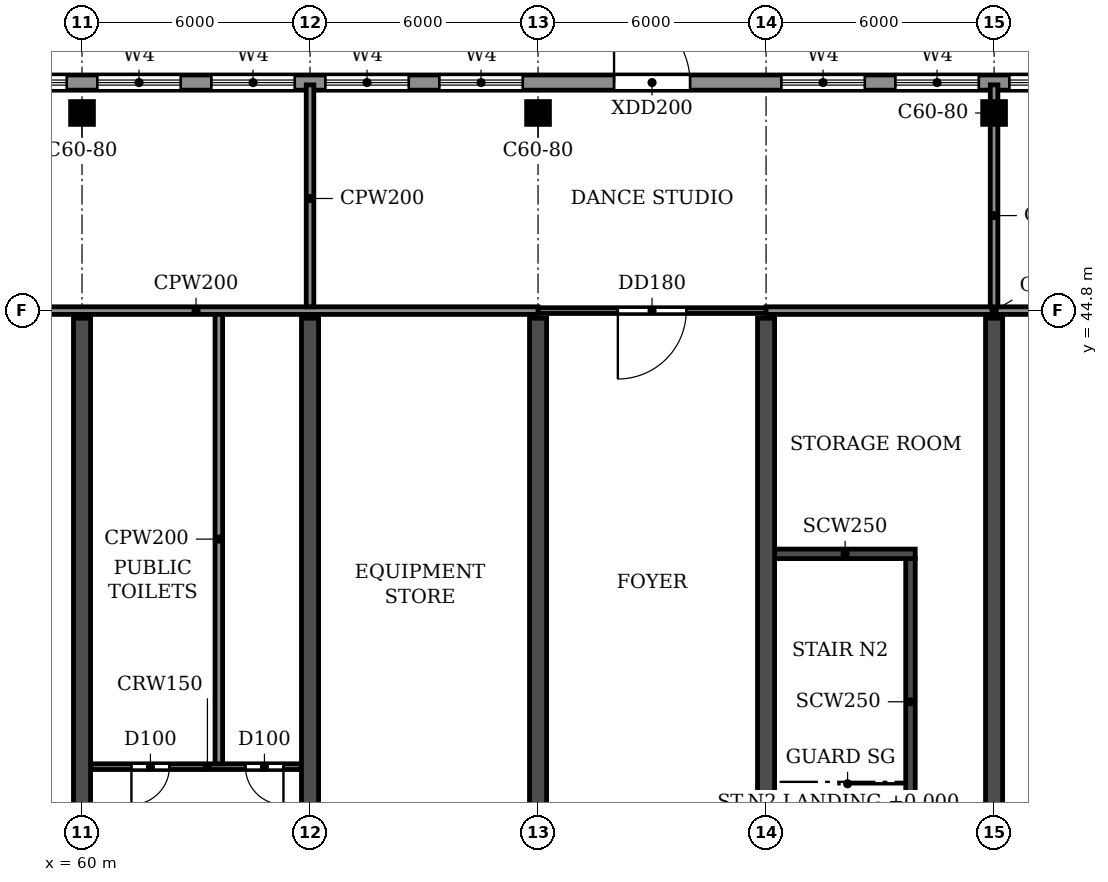
"""IFC4 building model, lengths in metres.
Left out: names, types, materials, properties, quantities, classifications, styles, units other than length and angle.
Written with IfcOpenShell. Run it as: python <this file> out.ifc"""

import sys

from ifc_helpers import new_model, si_unit, direction, frame, frame_2d, origin, origin_2d, place, context, subcontext, project, spatial, rectangle, extrude, source, transform, mapped, element, fill, save


model = new_model("IFC4")
c1 = context("Model", 3, precision=1e-05, world=origin(), true_north=direction((0.0, 1.0)))
c2 = subcontext(c1, "Body", "Model", "MODEL_VIEW")
j1 = project(units=[si_unit("LENGTHUNIT", "METRE"), si_unit("PLANEANGLEUNIT", "RADIAN")], contexts=[c1])
p1 = place(None, origin())
s1 = spatial("IfcSite", under=j1, at=p1, CompositionType="ELEMENT")
p2 = place(p1, origin())
s2 = spatial("IfcBuilding", under=s1, at=p2, CompositionType="ELEMENT")
p3 = place(p2, frame((0.0, 0.0, 19.2)))
s3 = spatial("IfcBuildingStorey", under=s2, at=p3, CompositionType="ELEMENT", Elevation=19.2)
for number, where, z_axis, x_axis in (
    (1, (60.0, 30.55, 0.0), (0.0, 0.0, 1.0), (0.0, 1.0, 0.0)),
    (2, (66.0, 30.55, 0.0), (0.0, 0.0, 1.0), (0.0, 1.0, 0.0)),
    (3, (72.0, 30.55, 0.0), (0.0, 0.0, 1.0), (0.0, 1.0, 0.0)),
    (4, (78.0, 30.55, 0.0), (0.0, 0.0, 1.0), (0.0, 1.0, 0.0)),
    (5, (84.0, 30.55, 0.0), (0.0, 0.0, 1.0), (0.0, 1.0, 0.0)),
):
    element("IfcWall", number, at=place(p3, frame(where, z_axis=z_axis, x_axis=x_axis)), inside=s3, PredefinedType="SHEAR", context=c2, shape_type="SweptSolid", body=[
        extrude(rectangle(XDim=14.05, YDim=0.45, at=frame_2d((7.025, 0.0))), origin(), (0.0, 0.0, 1.0), 3.95),
    ])
m1 = source(origin(), c2, "Body", "SweptSolid", [
    extrude(rectangle(XDim=0.6, YDim=0.6, at=origin_2d()), origin(), (0.0, 0.0, 1.0), 3.95),
])
for number, where, z_axis, x_axis in (
    (6, (60.0, 50.0, 0.0), (0.0, 0.0, 1.0), (1.0, 0.0, 0.0)),
    (7, (72.0, 50.0, 0.0), (0.0, 0.0, 1.0), (1.0, 0.0, 0.0)),
    (8, (84.0, 50.0, 0.0), (0.0, 0.0, 1.0), (1.0, 0.0, 0.0)),
):
    element("IfcColumn", number, at=place(p3, frame(where, z_axis=z_axis, x_axis=x_axis)), inside=s3, PredefinedType="COLUMN", context=c2, shape_type="MappedRepresentation", body=[
        mapped(m1, transform((0.0, 0.0, 0.0))),
    ])
p4 = place(p3, frame((81.8, 30.75, 0.0), z_axis=(0.0, 0.0, 1.0), x_axis=(0.0, 1.0, 0.0)))
e9 = element("IfcWall", 9, at=p4, inside=s3, PredefinedType="SOLIDWALL", context=c2, shape_type="SweptSolid", body=[
    extrude(rectangle(XDim=7.525, YDim=0.25, at=frame_2d((3.762, 0.0))), origin(), (0.0, 0.0, 1.0), 3.95),
])
p5 = place(p3, frame((78.0, 38.4, 0.0), z_axis=(0.0, 0.0, 1.0), x_axis=(1.0, 0.0, 0.0)))
e10 = element("IfcWall", 10, at=p5, inside=s3, PredefinedType="SOLIDWALL", context=c2, shape_type="SweptSolid", body=[
    extrude(rectangle(XDim=3.925, YDim=0.25, at=frame_2d((1.962, 0.0))), origin(), (0.0, 0.0, 1.0), 3.95),
])
p6 = place(p3, frame((105.0, 50.8, 0.0), z_axis=(0.0, 0.0, 1.0), x_axis=(-1.0, 0.0, 0.0)))
e11 = element("IfcWall", 11, at=p6, inside=s3, PredefinedType="STANDARD", context=c2, shape_type="SweptSolid", body=[
    extrude(rectangle(XDim=108.0, YDim=0.4, at=frame_2d((54.0, 0.0))), origin(), (0.0, 0.0, 1.0), 3.95),
])
p7 = place(p6, frame((102.4, 0.0, 0.9)))
e12 = element("IfcOpeningElement", 12, at=p7, cuts=e11, PredefinedType="OPENING", context=c2, shape_type="SweptSolid", body=[
    extrude(rectangle(XDim=2.2, YDim=2.7, at=frame_2d((1.1, 1.35))), frame((0.0, 0.21, 0.0), z_axis=(0.0, -1.0, 0.0), x_axis=(1.0, 0.0, 0.0)), (0.0, 0.0, 1.0), 0.42),
])
p8 = place(p6, frame((99.4, 0.0, 0.9)))
e13 = element("IfcOpeningElement", 13, at=p8, cuts=e11, PredefinedType="OPENING", context=c2, shape_type="SweptSolid", body=[
    extrude(rectangle(XDim=2.2, YDim=2.7, at=frame_2d((1.1, 1.35))), frame((0.0, 0.21, 0.0), z_axis=(0.0, -1.0, 0.0), x_axis=(1.0, 0.0, 0.0)), (0.0, 0.0, 1.0), 0.42),
])
p9 = place(p6, frame((96.4, 0.0, 0.9)))
e14 = element("IfcOpeningElement", 14, at=p9, cuts=e11, PredefinedType="OPENING", context=c2, shape_type="SweptSolid", body=[
    extrude(rectangle(XDim=2.2, YDim=2.7, at=frame_2d((1.1, 1.35))), frame((0.0, 0.21, 0.0), z_axis=(0.0, -1.0, 0.0), x_axis=(1.0, 0.0, 0.0)), (0.0, 0.0, 1.0), 0.42),
])
p10 = place(p6, frame((93.4, 0.0, 0.9)))
e15 = element("IfcOpeningElement", 15, at=p10, cuts=e11, PredefinedType="OPENING", context=c2, shape_type="SweptSolid", body=[
    extrude(rectangle(XDim=2.2, YDim=2.7, at=frame_2d((1.1, 1.35))), frame((0.0, 0.21, 0.0), z_axis=(0.0, -1.0, 0.0), x_axis=(1.0, 0.0, 0.0)), (0.0, 0.0, 1.0), 0.42),
])
p11 = place(p6, frame((90.4, 0.0, 0.9)))
e16 = element("IfcOpeningElement", 16, at=p11, cuts=e11, PredefinedType="OPENING", context=c2, shape_type="SweptSolid", body=[
    extrude(rectangle(XDim=2.2, YDim=2.7, at=frame_2d((1.1, 1.35))), frame((0.0, 0.21, 0.0), z_axis=(0.0, -1.0, 0.0), x_axis=(1.0, 0.0, 0.0)), (0.0, 0.0, 1.0), 0.42),
])
p12 = place(p6, frame((81.4, 0.0, 0.9)))
e17 = element("IfcOpeningElement", 17, at=p12, cuts=e11, PredefinedType="OPENING", context=c2, shape_type="SweptSolid", body=[
    extrude(rectangle(XDim=2.2, YDim=2.7, at=frame_2d((1.1, 1.35))), frame((0.0, 0.21, 0.0), z_axis=(0.0, -1.0, 0.0), x_axis=(1.0, 0.0, 0.0)), (0.0, 0.0, 1.0), 0.42),
])
p13 = place(p6, frame((78.4, 0.0, 0.9)))
e18 = element("IfcOpeningElement", 18, at=p13, cuts=e11, PredefinedType="OPENING", context=c2, shape_type="SweptSolid", body=[
    extrude(rectangle(XDim=2.2, YDim=2.7, at=frame_2d((1.1, 1.35))), frame((0.0, 0.21, 0.0), z_axis=(0.0, -1.0, 0.0), x_axis=(1.0, 0.0, 0.0)), (0.0, 0.0, 1.0), 0.42),
])
p14 = place(p6, frame((75.4, 0.0, 0.9)))
e19 = element("IfcOpeningElement", 19, at=p14, cuts=e11, PredefinedType="OPENING", context=c2, shape_type="SweptSolid", body=[
    extrude(rectangle(XDim=2.2, YDim=2.7, at=frame_2d((1.1, 1.35))), frame((0.0, 0.21, 0.0), z_axis=(0.0, -1.0, 0.0), x_axis=(1.0, 0.0, 0.0)), (0.0, 0.0, 1.0), 0.42),
])
p15 = place(p6, frame((72.4, 0.0, 0.9)))
e20 = element("IfcOpeningElement", 20, at=p15, cuts=e11, PredefinedType="OPENING", context=c2, shape_type="SweptSolid", body=[
    extrude(rectangle(XDim=2.2, YDim=2.7, at=frame_2d((1.1, 1.35))), frame((0.0, 0.21, 0.0), z_axis=(0.0, -1.0, 0.0), x_axis=(1.0, 0.0, 0.0)), (0.0, 0.0, 1.0), 0.42),
])
p16 = place(p6, frame((69.4, 0.0, 0.9)))
e21 = element("IfcOpeningElement", 21, at=p16, cuts=e11, PredefinedType="OPENING", context=c2, shape_type="SweptSolid", body=[
    extrude(rectangle(XDim=2.2, YDim=2.7, at=frame_2d((1.1, 1.35))), frame((0.0, 0.21, 0.0), z_axis=(0.0, -1.0, 0.0), x_axis=(1.0, 0.0, 0.0)), (0.0, 0.0, 1.0), 0.42),
])
p17 = place(p6, frame((66.4, 0.0, 0.9)))
e22 = element("IfcOpeningElement", 22, at=p17, cuts=e11, PredefinedType="OPENING", context=c2, shape_type="SweptSolid", body=[
    extrude(rectangle(XDim=2.2, YDim=2.7, at=frame_2d((1.1, 1.35))), frame((0.0, 0.21, 0.0), z_axis=(0.0, -1.0, 0.0), x_axis=(1.0, 0.0, 0.0)), (0.0, 0.0, 1.0), 0.42),
])
p18 = place(p6, frame((63.4, 0.0, 0.9)))
e23 = element("IfcOpeningElement", 23, at=p18, cuts=e11, PredefinedType="OPENING", context=c2, shape_type="SweptSolid", body=[
    extrude(rectangle(XDim=2.2, YDim=2.7, at=frame_2d((1.1, 1.35))), frame((0.0, 0.21, 0.0), z_axis=(0.0, -1.0, 0.0), x_axis=(1.0, 0.0, 0.0)), (0.0, 0.0, 1.0), 0.42),
])
p19 = place(p6, frame((60.4, 0.0, 0.9)))
e24 = element("IfcOpeningElement", 24, at=p19, cuts=e11, PredefinedType="OPENING", context=c2, shape_type="SweptSolid", body=[
    extrude(rectangle(XDim=2.2, YDim=2.7, at=frame_2d((1.1, 1.35))), frame((0.0, 0.21, 0.0), z_axis=(0.0, -1.0, 0.0), x_axis=(1.0, 0.0, 0.0)), (0.0, 0.0, 1.0), 0.42),
])
p20 = place(p6, frame((57.4, 0.0, 0.9)))
e25 = element("IfcOpeningElement", 25, at=p20, cuts=e11, PredefinedType="OPENING", context=c2, shape_type="SweptSolid", body=[
    extrude(rectangle(XDim=2.2, YDim=2.7, at=frame_2d((1.1, 1.35))), frame((0.0, 0.21, 0.0), z_axis=(0.0, -1.0, 0.0), x_axis=(1.0, 0.0, 0.0)), (0.0, 0.0, 1.0), 0.42),
])
p21 = place(p6, frame((48.4, 0.0, 0.9)))
e26 = element("IfcOpeningElement", 26, at=p21, cuts=e11, PredefinedType="OPENING", context=c2, shape_type="SweptSolid", body=[
    extrude(rectangle(XDim=2.2, YDim=2.7, at=frame_2d((1.1, 1.35))), frame((0.0, 0.21, 0.0), z_axis=(0.0, -1.0, 0.0), x_axis=(1.0, 0.0, 0.0)), (0.0, 0.0, 1.0), 0.42),
])
p22 = place(p6, frame((45.4, 0.0, 0.9)))
e27 = element("IfcOpeningElement", 27, at=p22, cuts=e11, PredefinedType="OPENING", context=c2, shape_type="SweptSolid", body=[
    extrude(rectangle(XDim=2.2, YDim=2.7, at=frame_2d((1.1, 1.35))), frame((0.0, 0.21, 0.0), z_axis=(0.0, -1.0, 0.0), x_axis=(1.0, 0.0, 0.0)), (0.0, 0.0, 1.0), 0.42),
])
p23 = place(p6, frame((42.4, 0.0, 0.9)))
e28 = element("IfcOpeningElement", 28, at=p23, cuts=e11, PredefinedType="OPENING", context=c2, shape_type="SweptSolid", body=[
    extrude(rectangle(XDim=2.2, YDim=2.7, at=frame_2d((1.1, 1.35))), frame((0.0, 0.21, 0.0), z_axis=(0.0, -1.0, 0.0), x_axis=(1.0, 0.0, 0.0)), (0.0, 0.0, 1.0), 0.42),
])
p24 = place(p6, frame((39.4, 0.0, 0.9)))
e29 = element("IfcOpeningElement", 29, at=p24, cuts=e11, PredefinedType="OPENING", context=c2, shape_type="SweptSolid", body=[
    extrude(rectangle(XDim=2.2, YDim=2.7, at=frame_2d((1.1, 1.35))), frame((0.0, 0.21, 0.0), z_axis=(0.0, -1.0, 0.0), x_axis=(1.0, 0.0, 0.0)), (0.0, 0.0, 1.0), 0.42),
])
p25 = place(p6, frame((36.4, 0.0, 0.9)))
e30 = element("IfcOpeningElement", 30, at=p25, cuts=e11, PredefinedType="OPENING", context=c2, shape_type="SweptSolid", body=[
    extrude(rectangle(XDim=2.2, YDim=2.7, at=frame_2d((1.1, 1.35))), frame((0.0, 0.21, 0.0), z_axis=(0.0, -1.0, 0.0), x_axis=(1.0, 0.0, 0.0)), (0.0, 0.0, 1.0), 0.42),
])
p26 = place(p6, frame((33.4, 0.0, 0.9)))
e31 = element("IfcOpeningElement", 31, at=p26, cuts=e11, PredefinedType="OPENING", context=c2, shape_type="SweptSolid", body=[
    extrude(rectangle(XDim=2.2, YDim=2.7, at=frame_2d((1.1, 1.35))), frame((0.0, 0.21, 0.0), z_axis=(0.0, -1.0, 0.0), x_axis=(1.0, 0.0, 0.0)), (0.0, 0.0, 1.0), 0.42),
])
p27 = place(p6, frame((24.4, 0.0, 0.9)))
e32 = element("IfcOpeningElement", 32, at=p27, cuts=e11, PredefinedType="OPENING", context=c2, shape_type="SweptSolid", body=[
    extrude(rectangle(XDim=2.2, YDim=2.7, at=frame_2d((1.1, 1.35))), frame((0.0, 0.21, 0.0), z_axis=(0.0, -1.0, 0.0), x_axis=(1.0, 0.0, 0.0)), (0.0, 0.0, 1.0), 0.42),
])
p28 = place(p6, frame((21.4, 0.0, 0.9)))
e33 = element("IfcOpeningElement", 33, at=p28, cuts=e11, PredefinedType="OPENING", context=c2, shape_type="SweptSolid", body=[
    extrude(rectangle(XDim=2.2, YDim=2.7, at=frame_2d((1.1, 1.35))), frame((0.0, 0.21, 0.0), z_axis=(0.0, -1.0, 0.0), x_axis=(1.0, 0.0, 0.0)), (0.0, 0.0, 1.0), 0.42),
])
p29 = place(p6, frame((18.4, 0.0, 0.9)))
e34 = element("IfcOpeningElement", 34, at=p29, cuts=e11, PredefinedType="OPENING", context=c2, shape_type="SweptSolid", body=[
    extrude(rectangle(XDim=2.2, YDim=2.7, at=frame_2d((1.1, 1.35))), frame((0.0, 0.21, 0.0), z_axis=(0.0, -1.0, 0.0), x_axis=(1.0, 0.0, 0.0)), (0.0, 0.0, 1.0), 0.42),
])
p30 = place(p6, frame((15.4, 0.0, 0.9)))
e35 = element("IfcOpeningElement", 35, at=p30, cuts=e11, PredefinedType="OPENING", context=c2, shape_type="SweptSolid", body=[
    extrude(rectangle(XDim=2.2, YDim=2.7, at=frame_2d((1.1, 1.35))), frame((0.0, 0.21, 0.0), z_axis=(0.0, -1.0, 0.0), x_axis=(1.0, 0.0, 0.0)), (0.0, 0.0, 1.0), 0.42),
])
p31 = place(p6, frame((12.4, 0.0, 0.9)))
e36 = element("IfcOpeningElement", 36, at=p31, cuts=e11, PredefinedType="OPENING", context=c2, shape_type="SweptSolid", body=[
    extrude(rectangle(XDim=2.2, YDim=2.7, at=frame_2d((1.1, 1.35))), frame((0.0, 0.21, 0.0), z_axis=(0.0, -1.0, 0.0), x_axis=(1.0, 0.0, 0.0)), (0.0, 0.0, 1.0), 0.42),
])
p32 = place(p6, frame((9.4, 0.0, 0.9)))
e37 = element("IfcOpeningElement", 37, at=p32, cuts=e11, PredefinedType="OPENING", context=c2, shape_type="SweptSolid", body=[
    extrude(rectangle(XDim=2.2, YDim=2.7, at=frame_2d((1.1, 1.35))), frame((0.0, 0.21, 0.0), z_axis=(0.0, -1.0, 0.0), x_axis=(1.0, 0.0, 0.0)), (0.0, 0.0, 1.0), 0.42),
])
p33 = place(p6, frame((6.4, 0.0, 0.9)))
e38 = element("IfcOpeningElement", 38, at=p33, cuts=e11, PredefinedType="OPENING", context=c2, shape_type="SweptSolid", body=[
    extrude(rectangle(XDim=2.2, YDim=2.7, at=frame_2d((1.1, 1.35))), frame((0.0, 0.21, 0.0), z_axis=(0.0, -1.0, 0.0), x_axis=(1.0, 0.0, 0.0)), (0.0, 0.0, 1.0), 0.42),
])
p34 = place(p6, frame((3.4, 0.0, 0.9)))
e39 = element("IfcOpeningElement", 39, at=p34, cuts=e11, PredefinedType="OPENING", context=c2, shape_type="SweptSolid", body=[
    extrude(rectangle(XDim=2.2, YDim=2.7, at=frame_2d((1.1, 1.35))), frame((0.0, 0.21, 0.0), z_axis=(0.0, -1.0, 0.0), x_axis=(1.0, 0.0, 0.0)), (0.0, 0.0, 1.0), 0.42),
])
p35 = place(p6, frame((86.0, 0.0, 0.0)))
e40 = element("IfcOpeningElement", 40, at=p35, cuts=e11, PredefinedType="OPENING", context=c2, shape_type="SweptSolid", body=[
    extrude(rectangle(XDim=2.0, YDim=2.4, at=frame_2d((1.0, 1.2))), frame((0.0, 0.21, 0.0), z_axis=(0.0, -1.0, 0.0), x_axis=(1.0, 0.0, 0.0)), (0.0, 0.0, 1.0), 0.42),
])
p36 = place(p6, frame((53.0, 0.0, 0.0)))
e41 = element("IfcOpeningElement", 41, at=p36, cuts=e11, PredefinedType="OPENING", context=c2, shape_type="SweptSolid", body=[
    extrude(rectangle(XDim=2.0, YDim=2.4, at=frame_2d((1.0, 1.2))), frame((0.0, 0.21, 0.0), z_axis=(0.0, -1.0, 0.0), x_axis=(1.0, 0.0, 0.0)), (0.0, 0.0, 1.0), 0.42),
])
p37 = place(p6, frame((29.0, 0.0, 0.0)))
e42 = element("IfcOpeningElement", 42, at=p37, cuts=e11, PredefinedType="OPENING", context=c2, shape_type="SweptSolid", body=[
    extrude(rectangle(XDim=2.0, YDim=2.4, at=frame_2d((1.0, 1.2))), frame((0.0, 0.21, 0.0), z_axis=(0.0, -1.0, 0.0), x_axis=(1.0, 0.0, 0.0)), (0.0, 0.0, 1.0), 0.42),
])
p38 = place(p3, frame((60.235, 32.8, 0.0), z_axis=(0.0, 0.0, 1.0), x_axis=(1.0, 0.0, 0.0)))
e43 = element("IfcWall", 43, at=p38, inside=s3, PredefinedType="PARTITIONING", context=c2, shape_type="SweptSolid", body=[
    extrude(rectangle(XDim=5.53, YDim=0.15, at=frame_2d((2.765, 0.0))), origin(), (0.0, 0.0, 1.0), 3.95),
])
p39 = place(p38, frame((1.065, 0.0, 0.0)))
e44 = element("IfcOpeningElement", 44, at=p39, cuts=e43, PredefinedType="OPENING", context=c2, shape_type="SweptSolid", body=[
    extrude(rectangle(XDim=1.0, YDim=2.1, at=frame_2d((0.5, 1.05))), frame((0.0, 0.085, 0.0), z_axis=(0.0, -1.0, 0.0), x_axis=(1.0, 0.0, 0.0)), (0.0, 0.0, 1.0), 0.17),
])
p40 = place(p38, frame((4.065, 0.0, 0.0)))
e45 = element("IfcOpeningElement", 45, at=p40, cuts=e43, PredefinedType="OPENING", context=c2, shape_type="SweptSolid", body=[
    extrude(rectangle(XDim=1.0, YDim=2.1, at=frame_2d((0.5, 1.05))), frame((0.0, 0.085, 0.0), z_axis=(0.0, -1.0, 0.0), x_axis=(1.0, 0.0, 0.0)), (0.0, 0.0, 1.0), 0.17),
])
p41 = place(p3, frame((72.0, 44.8, 0.0), z_axis=(0.0, 0.0, 1.0), x_axis=(1.0, 0.0, 0.0)))
e46 = element("IfcWall", 46, at=p41, inside=s3, PredefinedType="PARTITIONING", context=c2, shape_type="SweptSolid", body=[
    extrude(rectangle(XDim=6.0, YDim=0.15, at=frame_2d((3.0, 0.0))), origin(), (0.0, 0.0, 1.0), 3.95),
])
p42 = place(p41, frame((2.1, 0.0, 0.0)))
e47 = element("IfcOpeningElement", 47, at=p42, cuts=e46, PredefinedType="OPENING", context=c2, shape_type="SweptSolid", body=[
    extrude(rectangle(XDim=1.8, YDim=2.1, at=frame_2d((0.9, 1.05))), frame((0.0, 0.085, 0.0), z_axis=(0.0, -1.0, 0.0), x_axis=(1.0, 0.0, 0.0)), (0.0, 0.0, 1.0), 0.17),
])
p43 = place(p3, frame((54.0, 44.8, 0.0), z_axis=(0.0, 0.0, 1.0), x_axis=(1.0, 0.0, 0.0)))
e48 = element("IfcWall", 48, at=p43, inside=s3, PredefinedType="PARTITIONING", context=c2, shape_type="SweptSolid", body=[
    extrude(rectangle(XDim=18.0, YDim=0.2, at=frame_2d((9.0, 0.0))), origin(), (0.0, 0.0, 1.0), 3.95),
])
p44 = place(p3, frame((78.0, 44.8, 0.0), z_axis=(0.0, 0.0, 1.0), x_axis=(1.0, 0.0, 0.0)))
e49 = element("IfcWall", 49, at=p44, inside=s3, PredefinedType="PARTITIONING", context=c2, shape_type="SweptSolid", body=[
    extrude(rectangle(XDim=12.0, YDim=0.2, at=frame_2d((6.0, 0.0))), origin(), (0.0, 0.0, 1.0), 3.95),
])
p45 = place(p3, frame((63.6, 32.875, 0.0), z_axis=(0.0, 0.0, 1.0), x_axis=(0.0, 1.0, 0.0)))
e50 = element("IfcWall", 50, at=p45, inside=s3, PredefinedType="PARTITIONING", context=c2, shape_type="SweptSolid", body=[
    extrude(rectangle(XDim=11.825, YDim=0.2, at=frame_2d((5.913, 0.0))), origin(), (0.0, 0.0, 1.0), 3.95),
])
for number, where, z_axis, x_axis in (
    (51, (66.0, 44.9, 0.0), (0.0, 0.0, 1.0), (0.0, 1.0, 0.0)),
    (52, (84.0, 44.9, 0.0), (0.0, 0.0, 1.0), (0.0, 1.0, 0.0)),
):
    element("IfcWall", number, at=place(p3, frame(where, z_axis=z_axis, x_axis=x_axis)), inside=s3, PredefinedType="PARTITIONING", context=c2, shape_type="SweptSolid", body=[
        extrude(rectangle(XDim=5.84, YDim=0.2, at=frame_2d((2.92, 0.0))), origin(), (0.0, 0.0, 1.0), 3.95),
    ])
p46 = place(p22, origin())
e53 = element("IfcWindow", 53, at=p46, inside=s3, PartitioningType="DOUBLE_PANEL_HORIZONTAL", PredefinedType="WINDOW", context=c2, shape_type="SweptSolid", body=[
    extrude(rectangle(XDim=2.2, YDim=2.7, at=frame_2d((1.1, 1.35))), frame((0.0, 0.03, 0.0), z_axis=(0.0, -1.0, 0.0), x_axis=(1.0, 0.0, 0.0)), (0.0, 0.0, 1.0), 0.06),
])
fill(e27, e53)
p47 = place(p23, origin())
e54 = element("IfcWindow", 54, at=p47, inside=s3, PartitioningType="DOUBLE_PANEL_HORIZONTAL", PredefinedType="WINDOW", context=c2, shape_type="SweptSolid", body=[
    extrude(rectangle(XDim=2.2, YDim=2.7, at=frame_2d((1.1, 1.35))), frame((0.0, 0.03, 0.0), z_axis=(0.0, -1.0, 0.0), x_axis=(1.0, 0.0, 0.0)), (0.0, 0.0, 1.0), 0.06),
])
fill(e28, e54)
p48 = place(p24, origin())
e55 = element("IfcWindow", 55, at=p48, inside=s3, PartitioningType="DOUBLE_PANEL_HORIZONTAL", PredefinedType="WINDOW", context=c2, shape_type="SweptSolid", body=[
    extrude(rectangle(XDim=2.2, YDim=2.7, at=frame_2d((1.1, 1.35))), frame((0.0, 0.03, 0.0), z_axis=(0.0, -1.0, 0.0), x_axis=(1.0, 0.0, 0.0)), (0.0, 0.0, 1.0), 0.06),
])
fill(e29, e55)
p49 = place(p25, origin())
e56 = element("IfcWindow", 56, at=p49, inside=s3, PartitioningType="DOUBLE_PANEL_HORIZONTAL", PredefinedType="WINDOW", context=c2, shape_type="SweptSolid", body=[
    extrude(rectangle(XDim=2.2, YDim=2.7, at=frame_2d((1.1, 1.35))), frame((0.0, 0.03, 0.0), z_axis=(0.0, -1.0, 0.0), x_axis=(1.0, 0.0, 0.0)), (0.0, 0.0, 1.0), 0.06),
])
fill(e30, e56)
p50 = place(p26, origin())
e57 = element("IfcWindow", 57, at=p50, inside=s3, PartitioningType="DOUBLE_PANEL_HORIZONTAL", PredefinedType="WINDOW", context=c2, shape_type="SweptSolid", body=[
    extrude(rectangle(XDim=2.2, YDim=2.7, at=frame_2d((1.1, 1.35))), frame((0.0, 0.03, 0.0), z_axis=(0.0, -1.0, 0.0), x_axis=(1.0, 0.0, 0.0)), (0.0, 0.0, 1.0), 0.06),
])
fill(e31, e57)
p51 = place(p27, origin())
e58 = element("IfcWindow", 58, at=p51, inside=s3, PartitioningType="DOUBLE_PANEL_HORIZONTAL", PredefinedType="WINDOW", context=c2, shape_type="SweptSolid", body=[
    extrude(rectangle(XDim=2.2, YDim=2.7, at=frame_2d((1.1, 1.35))), frame((0.0, 0.03, 0.0), z_axis=(0.0, -1.0, 0.0), x_axis=(1.0, 0.0, 0.0)), (0.0, 0.0, 1.0), 0.06),
])
fill(e32, e58)
p52 = place(p28, origin())
e59 = element("IfcWindow", 59, at=p52, inside=s3, PartitioningType="DOUBLE_PANEL_HORIZONTAL", PredefinedType="WINDOW", context=c2, shape_type="SweptSolid", body=[
    extrude(rectangle(XDim=2.2, YDim=2.7, at=frame_2d((1.1, 1.35))), frame((0.0, 0.03, 0.0), z_axis=(0.0, -1.0, 0.0), x_axis=(1.0, 0.0, 0.0)), (0.0, 0.0, 1.0), 0.06),
])
fill(e33, e59)
p53 = place(p29, origin())
e60 = element("IfcWindow", 60, at=p53, inside=s3, PartitioningType="DOUBLE_PANEL_HORIZONTAL", PredefinedType="WINDOW", context=c2, shape_type="SweptSolid", body=[
    extrude(rectangle(XDim=2.2, YDim=2.7, at=frame_2d((1.1, 1.35))), frame((0.0, 0.03, 0.0), z_axis=(0.0, -1.0, 0.0), x_axis=(1.0, 0.0, 0.0)), (0.0, 0.0, 1.0), 0.06),
])
fill(e34, e60)
p54 = place(p39, frame((1.0, 0.0, 0.0), z_axis=(0.0, 0.0, 1.0), x_axis=(-1.0, 0.0, 0.0)))
e61 = element("IfcDoor", 61, at=p54, inside=s3, OperationType="SINGLE_SWING_RIGHT", PredefinedType="DOOR", context=c2, shape_type="SweptSolid", body=[
    extrude(rectangle(XDim=1.0, YDim=2.1, at=frame_2d((0.5, 1.05))), frame((0.0, 0.025, 0.0), z_axis=(0.0, -1.0, 0.0), x_axis=(1.0, 0.0, 0.0)), (0.0, 0.0, 1.0), 0.05),
])
fill(e44, e61)
p55 = place(p40, frame((1.0, 0.0, 0.0), z_axis=(0.0, 0.0, 1.0), x_axis=(-1.0, 0.0, 0.0)))
e62 = element("IfcDoor", 62, at=p55, inside=s3, OperationType="SINGLE_SWING_LEFT", PredefinedType="DOOR", context=c2, shape_type="SweptSolid", body=[
    extrude(rectangle(XDim=1.0, YDim=2.1, at=frame_2d((0.5, 1.05))), frame((0.0, 0.025, 0.0), z_axis=(0.0, -1.0, 0.0), x_axis=(1.0, 0.0, 0.0)), (0.0, 0.0, 1.0), 0.05),
])
fill(e45, e62)
p56 = place(p42, frame((1.8, 0.0, 0.0), z_axis=(0.0, 0.0, 1.0), x_axis=(-1.0, 0.0, 0.0)))
e63 = element("IfcDoor", 63, at=p56, inside=s3, OperationType="DOUBLE_DOOR_SINGLE_SWING", PredefinedType="DOOR", context=c2, shape_type="SweptSolid", body=[
    extrude(rectangle(XDim=1.8, YDim=2.1, at=frame_2d((0.9, 1.05))), frame((0.0, 0.025, 0.0), z_axis=(0.0, -1.0, 0.0), x_axis=(1.0, 0.0, 0.0)), (0.0, 0.0, 1.0), 0.05),
])
fill(e47, e63)
p57 = place(p37, frame((2.0, 0.0, 0.0), z_axis=(0.0, 0.0, 1.0), x_axis=(-1.0, 0.0, 0.0)))
e64 = element("IfcDoor", 64, at=p57, inside=s3, OperationType="DOUBLE_DOOR_SINGLE_SWING", PredefinedType="DOOR", context=c2, shape_type="SweptSolid", body=[
    extrude(rectangle(XDim=2.0, YDim=2.4, at=frame_2d((1.0, 1.2))), frame((0.0, 0.025, 0.0), z_axis=(0.0, -1.0, 0.0), x_axis=(1.0, 0.0, 0.0)), (0.0, 0.0, 1.0), 0.05),
])
fill(e42, e64)
save(model, sys.argv[1])
